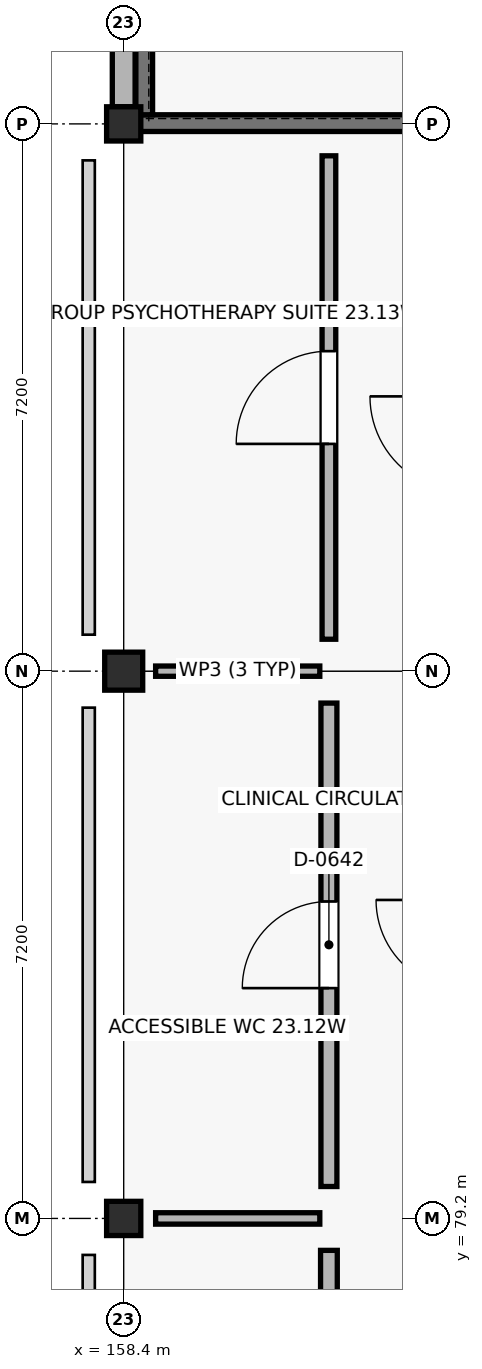
"""IFC4 building model, lengths in metres.
Left out: names, types, materials, properties, quantities, classifications, styles, units other than length and angle.
Written with IfcOpenShell. Run it as: python <this file> out.ifc"""

import sys

from ifc_helpers import new_model, si_unit, direction, frame, frame_2d, origin, origin_2d, place, context, subcontext, project, spatial, rectangle, extrude, element, fill, save


model = new_model("IFC4")
c1 = context("Model", 3, precision=1e-05, world=origin(), true_north=direction((0.0, 1.0)))
c2 = subcontext(c1, "Body", "Model", "MODEL_VIEW")
j1 = project(units=[si_unit("LENGTHUNIT", "METRE"), si_unit("PLANEANGLEUNIT", "RADIAN")], contexts=[c1])
p1 = place(None, origin())
s1 = spatial("IfcSite", under=j1, at=p1, CompositionType="ELEMENT")
p2 = place(p1, origin())
s2 = spatial("IfcBuilding", under=s1, at=p2, CompositionType="ELEMENT")
p3 = place(p2, frame((0.0, 0.0, 17.55)))
s3 = spatial("IfcBuildingStorey", under=s2, at=p3, CompositionType="ELEMENT", Elevation=17.55)
p4 = place(p3, frame((158.4, 79.2, 0.0), z_axis=(0.0, 0.0, 1.0), x_axis=(1.0, 0.0, 0.0)))
e1 = element("IfcColumn", 1, at=p4, inside=s3, PredefinedType="COLUMN", context=c2, shape_type="SweptSolid", body=[
    extrude(rectangle(XDim=0.45, YDim=0.45, at=origin_2d()), origin(), (0.0, 0.0, 1.0), 3.83),
])
p5 = place(p3, frame((158.4, 86.4, 0.0), z_axis=(0.0, 0.0, 1.0), x_axis=(1.0, 0.0, 0.0)))
e2 = element("IfcColumn", 2, at=p5, inside=s3, PredefinedType="COLUMN", context=c2, shape_type="SweptSolid", body=[
    extrude(rectangle(XDim=0.5, YDim=0.5, at=origin_2d()), origin(), (0.0, 0.0, 1.0), 3.83),
])
p6 = place(p3, frame((158.4, 93.6, 0.0), z_axis=(0.0, 0.0, 1.0), x_axis=(1.0, 0.0, 0.0)))
e3 = element("IfcColumn", 3, at=p6, inside=s3, PredefinedType="COLUMN", context=c2, shape_type="SweptSolid", body=[
    extrude(rectangle(XDim=0.45, YDim=0.45, at=origin_2d()), origin(), (0.0, 0.0, 1.0), 3.83),
])
p7 = place(p3, frame((158.4, 100.55, 0.0), z_axis=(0.0, 0.0, 1.0), x_axis=(0.0, -1.0, 0.0)))
e4 = element("IfcWall", 4, at=p7, inside=s3, PredefinedType="STANDARD", context=c2, shape_type="SweptSolid", body=[
    extrude(rectangle(XDim=6.725, YDim=0.3, at=frame_2d((3.363, 0.0))), origin(), (0.0, 0.0, 1.0), 3.25),
])
p8 = place(p3, frame((158.56, 93.61, 0.0), z_axis=(0.0, 0.0, 1.0), x_axis=(1.0, 0.0, 0.0)))
e5 = element("IfcWall", 5, at=p8, inside=s3, PredefinedType="SHEAR", context=c2, shape_type="SweptSolid", body=[
    extrude(rectangle(XDim=6.88, YDim=0.22, at=frame_2d((3.44, 0.0))), origin(), (0.0, 0.0, 1.0), 3.8),
])
p9 = place(p8, frame((5.3, 0.0, 0.0)))
e6 = element("IfcOpeningElement", 6, at=p9, cuts=e5, PredefinedType="OPENING", context=c2, shape_type="SweptSolid", body=[
    extrude(rectangle(XDim=1.15, YDim=2.15, at=frame_2d((0.575, 1.075))), frame((0.0, 0.12, 0.0), z_axis=(0.0, -1.0, 0.0), x_axis=(1.0, 0.0, 0.0)), (0.0, 0.0, 1.0), 0.24),
])
p10 = place(p3, frame((158.67, 93.72, 0.0), z_axis=(0.0, 0.0, 1.0), x_axis=(0.0, 1.0, 0.0)))
e7 = element("IfcWall", 7, at=p10, inside=s3, PredefinedType="SHEAR", context=c2, shape_type="SweptSolid", body=[
    extrude(rectangle(XDim=3.0, YDim=0.22, at=frame_2d((1.5, 0.0))), origin(), (0.0, 0.0, 1.0), 3.8),
])
p11 = place(p3, frame((161.1, 72.42, 0.0), z_axis=(0.0, 0.0, 1.0), x_axis=(0.0, 1.0, 0.0)))
e8 = element("IfcWall", 8, at=p11, inside=s3, PredefinedType="SOLIDWALL", context=c2, shape_type="SweptSolid", body=[
    extrude(rectangle(XDim=6.36, YDim=0.22, at=frame_2d((3.18, 0.0))), origin(), (0.0, 0.0, 1.0), 2.94),
])
p12 = place(p11, frame((2.65, 0.0, 0.0)))
e9 = element("IfcOpeningElement", 9, at=p12, cuts=e8, PredefinedType="OPENING", context=c2, shape_type="SweptSolid", body=[
    extrude(rectangle(XDim=1.06, YDim=2.04, at=frame_2d((0.53, 1.02))), frame((0.0, 0.12, 0.0), z_axis=(0.0, -1.0, 0.0), x_axis=(1.0, 0.0, 0.0)), (0.0, 0.0, 1.0), 0.24),
])
p13 = place(p3, frame((158.82, 79.2, 0.0), z_axis=(0.0, 0.0, 1.0), x_axis=(1.0, 0.0, 0.0)))
e10 = element("IfcWall", 10, at=p13, inside=s3, PredefinedType="PARTITIONING", context=c2, shape_type="SweptSolid", body=[
    extrude(rectangle(XDim=2.16, YDim=0.15, at=frame_2d((1.08, 0.0))), origin(), (0.0, 0.0, 1.0), 2.94),
])
p14 = place(p3, frame((161.1, 79.62, 0.0), z_axis=(0.0, 0.0, 1.0), x_axis=(0.0, 1.0, 0.0)))
e11 = element("IfcWall", 11, at=p14, inside=s3, PredefinedType="PLUMBINGWALL", context=c2, shape_type="SweptSolid", body=[
    extrude(rectangle(XDim=6.36, YDim=0.21, at=frame_2d((3.18, 0.0))), origin(), (0.0, 0.0, 1.0), 2.94),
])
p15 = place(p14, frame((2.61, 0.0, 0.0)))
e12 = element("IfcOpeningElement", 12, at=p15, cuts=e11, PredefinedType="OPENING", context=c2, shape_type="SweptSolid", body=[
    extrude(rectangle(XDim=1.14, YDim=2.04, at=frame_2d((0.57, 1.02))), frame((0.0, 0.115, 0.0), z_axis=(0.0, -1.0, 0.0), x_axis=(1.0, 0.0, 0.0)), (0.0, 0.0, 1.0), 0.23),
])
p16 = place(p3, frame((158.82, 86.4, 0.0), z_axis=(0.0, 0.0, 1.0), x_axis=(1.0, 0.0, 0.0)))
e13 = element("IfcWall", 13, at=p16, inside=s3, PredefinedType="PARTITIONING", context=c2, shape_type="SweptSolid", body=[
    extrude(rectangle(XDim=2.16, YDim=0.135, at=frame_2d((1.08, 0.0))), origin(), (0.0, 0.0, 1.0), 2.94),
])
p17 = place(p3, frame((161.1, 86.82, 0.0), z_axis=(0.0, 0.0, 1.0), x_axis=(0.0, 1.0, 0.0)))
e14 = element("IfcWall", 14, at=p17, inside=s3, PredefinedType="PARTITIONING", context=c2, shape_type="SweptSolid", body=[
    extrude(rectangle(XDim=6.36, YDim=0.18, at=frame_2d((3.18, 0.0))), origin(), (0.0, 0.0, 1.0), 2.94),
])
p18 = place(p17, frame((2.57, 0.0, 0.0)))
e15 = element("IfcOpeningElement", 15, at=p18, cuts=e14, PredefinedType="OPENING", context=c2, shape_type="SweptSolid", body=[
    extrude(rectangle(XDim=1.22, YDim=2.04, at=frame_2d((0.61, 1.02))), frame((0.0, 0.1, 0.0), z_axis=(0.0, -1.0, 0.0), x_axis=(1.0, 0.0, 0.0)), (0.0, 0.0, 1.0), 0.2),
])
p19 = place(p15, origin())
e16 = element("IfcDoor", 16, at=p19, inside=s3, OperationType="SINGLE_SWING_LEFT", PredefinedType="DOOR", context=c2, shape_type="SweptSolid", body=[
    extrude(rectangle(XDim=1.14, YDim=2.04, at=frame_2d((0.57, 1.02))), frame((0.0, 0.025, 0.0), z_axis=(0.0, -1.0, 0.0), x_axis=(1.0, 0.0, 0.0)), (0.0, 0.0, 1.0), 0.05),
])
fill(e12, e16)
p20 = place(p18, origin())
e17 = element("IfcDoor", 17, at=p20, inside=s3, OperationType="SINGLE_SWING_LEFT", PredefinedType="DOOR", context=c2, shape_type="SweptSolid", body=[
    extrude(rectangle(XDim=1.22, YDim=2.04, at=frame_2d((0.61, 1.02))), frame((0.0, 0.025, 0.0), z_axis=(0.0, -1.0, 0.0), x_axis=(1.0, 0.0, 0.0)), (0.0, 0.0, 1.0), 0.05),
])
fill(e15, e17)
save(model, sys.argv[1])
